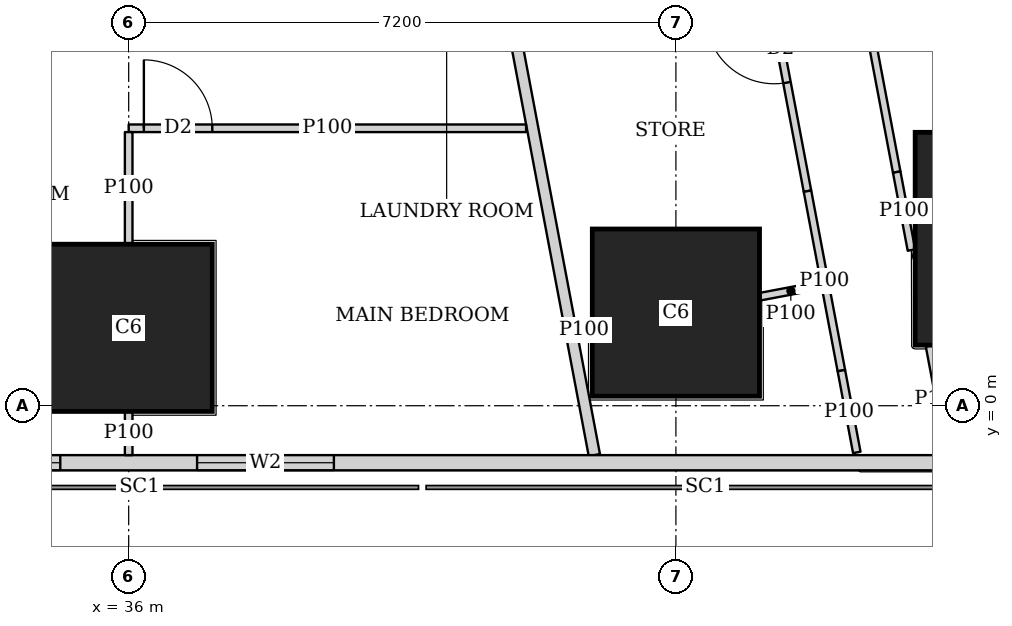
"""IFC4 building model, lengths in metres.
Left out: names, types, materials, properties, quantities, classifications, styles, units other than length and angle.
Written with IfcOpenShell. Run it as: python <this file> out.ifc"""

import sys

from ifc_helpers import new_model, si_unit, direction, frame, frame_2d, origin, origin_2d, place, context, subcontext, project, spatial, rectangle, extrude, element, fill, save


model = new_model("IFC4")
c1 = context("Model", 3, precision=1e-05, world=origin(), true_north=direction((0.0, 1.0)))
c2 = subcontext(c1, "Body", "Model", "MODEL_VIEW")
j1 = project(units=[si_unit("LENGTHUNIT", "METRE"), si_unit("PLANEANGLEUNIT", "RADIAN")], contexts=[c1])
p1 = place(None, origin())
s1 = spatial("IfcSite", under=j1, at=p1, CompositionType="ELEMENT")
p2 = place(p1, origin())
s2 = spatial("IfcBuilding", under=s1, at=p2, CompositionType="ELEMENT")
p3 = place(p2, frame((0.0, 0.0, 100.4)))
s3 = spatial("IfcBuildingStorey", under=s2, at=p3, CompositionType="ELEMENT", Elevation=100.4)
for number, where, z_axis, x_axis in (
    (1, (36.0, 1.025, 0.0), (0.0, 0.0, 1.0), (1.0, 0.0, 0.0)),
    (2, (43.2, 1.225, 0.0), (0.0, 0.0, 1.0), (1.0, 0.0, 0.0)),
):
    element("IfcColumn", number, at=place(p3, frame(where, z_axis=z_axis, x_axis=x_axis)), inside=s3, PredefinedType="COLUMN", context=c2, shape_type="SweptSolid", body=[
        extrude(rectangle(XDim=2.2, YDim=2.2, at=origin_2d()), origin(), (0.0, 0.0, 1.0), 3.75),
    ])
p4 = place(p3, frame((47.748, 2.197, 0.0), z_axis=(0.0, 0.0, 1.0), x_axis=(1.0, 0.0, 0.0)))
e3 = element("IfcColumn", 3, at=p4, inside=s3, PredefinedType="COLUMN", context=c2, shape_type="SweptSolid", body=[
    extrude(rectangle(XDim=2.8, YDim=2.8, at=origin_2d()), origin(), (0.0, 0.0, 1.0), 3.75),
])
p5 = place(p3, frame((2.163, -0.75, 0.0), z_axis=(0.0, 0.0, 1.0), x_axis=(1.0, 0.0, 0.0)))
e4 = element("IfcWall", 4, at=p5, inside=s3, PredefinedType="SOLIDWALL", context=c2, shape_type="SweptSolid", body=[
    extrude(rectangle(XDim=45.628, YDim=0.2, at=frame_2d((22.814, 0.0))), origin(), (0.0, 0.0, 1.0), 3.5),
])
p6 = place(p5, frame((9.537, 0.0, 0.9)))
e5 = element("IfcOpeningElement", 5, at=p6, cuts=e4, PredefinedType="OPENING", context=c2, shape_type="SweptSolid", body=[
    extrude(rectangle(XDim=1.8, YDim=1.5, at=frame_2d((0.9, 0.75))), frame((0.0, 0.11, 0.0), z_axis=(0.0, -1.0, 0.0), x_axis=(1.0, 0.0, 0.0)), (0.0, 0.0, 1.0), 0.22),
])
p7 = place(p5, frame((13.137, 0.0, 0.9)))
e6 = element("IfcOpeningElement", 6, at=p7, cuts=e4, PredefinedType="OPENING", context=c2, shape_type="SweptSolid", body=[
    extrude(rectangle(XDim=1.8, YDim=1.5, at=frame_2d((0.9, 0.75))), frame((0.0, 0.11, 0.0), z_axis=(0.0, -1.0, 0.0), x_axis=(1.0, 0.0, 0.0)), (0.0, 0.0, 1.0), 0.22),
])
p8 = place(p5, frame((16.737, 0.0, 0.9)))
e7 = element("IfcOpeningElement", 7, at=p8, cuts=e4, PredefinedType="OPENING", context=c2, shape_type="SweptSolid", body=[
    extrude(rectangle(XDim=1.8, YDim=1.5, at=frame_2d((0.9, 0.75))), frame((0.0, 0.11, 0.0), z_axis=(0.0, -1.0, 0.0), x_axis=(1.0, 0.0, 0.0)), (0.0, 0.0, 1.0), 0.22),
])
p9 = place(p5, frame((20.337, 0.0, 0.9)))
e8 = element("IfcOpeningElement", 8, at=p9, cuts=e4, PredefinedType="OPENING", context=c2, shape_type="SweptSolid", body=[
    extrude(rectangle(XDim=1.8, YDim=1.5, at=frame_2d((0.9, 0.75))), frame((0.0, 0.11, 0.0), z_axis=(0.0, -1.0, 0.0), x_axis=(1.0, 0.0, 0.0)), (0.0, 0.0, 1.0), 0.22),
])
p10 = place(p5, frame((23.937, 0.0, 0.9)))
e9 = element("IfcOpeningElement", 9, at=p10, cuts=e4, PredefinedType="OPENING", context=c2, shape_type="SweptSolid", body=[
    extrude(rectangle(XDim=1.8, YDim=1.5, at=frame_2d((0.9, 0.75))), frame((0.0, 0.11, 0.0), z_axis=(0.0, -1.0, 0.0), x_axis=(1.0, 0.0, 0.0)), (0.0, 0.0, 1.0), 0.22),
])
p11 = place(p5, frame((27.537, 0.0, 0.9)))
e10 = element("IfcOpeningElement", 10, at=p11, cuts=e4, PredefinedType="OPENING", context=c2, shape_type="SweptSolid", body=[
    extrude(rectangle(XDim=1.8, YDim=1.5, at=frame_2d((0.9, 0.75))), frame((0.0, 0.11, 0.0), z_axis=(0.0, -1.0, 0.0), x_axis=(1.0, 0.0, 0.0)), (0.0, 0.0, 1.0), 0.22),
])
p12 = place(p5, frame((31.137, 0.0, 0.9)))
e11 = element("IfcOpeningElement", 11, at=p12, cuts=e4, PredefinedType="OPENING", context=c2, shape_type="SweptSolid", body=[
    extrude(rectangle(XDim=1.8, YDim=1.5, at=frame_2d((0.9, 0.75))), frame((0.0, 0.11, 0.0), z_axis=(0.0, -1.0, 0.0), x_axis=(1.0, 0.0, 0.0)), (0.0, 0.0, 1.0), 0.22),
])
p13 = place(p5, frame((34.737, 0.0, 0.9)))
e12 = element("IfcOpeningElement", 12, at=p13, cuts=e4, PredefinedType="OPENING", context=c2, shape_type="SweptSolid", body=[
    extrude(rectangle(XDim=1.8, YDim=1.5, at=frame_2d((0.9, 0.75))), frame((0.0, 0.11, 0.0), z_axis=(0.0, -1.0, 0.0), x_axis=(1.0, 0.0, 0.0)), (0.0, 0.0, 1.0), 0.22),
])
p14 = place(p3, frame((50.653, 2.703, 0.0), z_axis=(0.0, 0.0, 1.0), x_axis=(-0.185612026696, 0.982623109613, 0.0)))
e13 = element("IfcWall", 13, at=p14, inside=s3, PredefinedType="SOLIDWALL", context=c2, shape_type="SweptSolid", body=[
    extrude(rectangle(XDim=41.393, YDim=0.2, at=frame_2d((20.697, 0.0))), origin(), (0.0, 0.0, 1.0), 3.5),
])
p15 = place(p14, frame((1.633, 0.0, 0.9)))
e14 = element("IfcOpeningElement", 14, at=p15, cuts=e13, PredefinedType="OPENING", context=c2, shape_type="SweptSolid", body=[
    extrude(rectangle(XDim=1.8, YDim=1.5, at=frame_2d((0.9, 0.75))), frame((0.0, 0.11, 0.0), z_axis=(0.0, -1.0, 0.0), x_axis=(1.0, 0.0, 0.0)), (0.0, 0.0, 1.0), 0.22),
])
p16 = place(p14, frame((6.032, 0.0, 0.9)))
e15 = element("IfcOpeningElement", 15, at=p16, cuts=e13, PredefinedType="OPENING", context=c2, shape_type="SweptSolid", body=[
    extrude(rectangle(XDim=1.8, YDim=1.5, at=frame_2d((0.9, 0.75))), frame((0.0, 0.11, 0.0), z_axis=(0.0, -1.0, 0.0), x_axis=(1.0, 0.0, 0.0)), (0.0, 0.0, 1.0), 0.22),
])
p17 = place(p14, frame((9.848, 0.0, 0.9)))
e16 = element("IfcOpeningElement", 16, at=p17, cuts=e13, PredefinedType="OPENING", context=c2, shape_type="SweptSolid", body=[
    extrude(rectangle(XDim=1.8, YDim=1.5, at=frame_2d((0.9, 0.75))), frame((0.0, 0.11, 0.0), z_axis=(0.0, -1.0, 0.0), x_axis=(1.0, 0.0, 0.0)), (0.0, 0.0, 1.0), 0.22),
])
p18 = place(p14, frame((13.664, 0.0, 0.9)))
e17 = element("IfcOpeningElement", 17, at=p18, cuts=e13, PredefinedType="OPENING", context=c2, shape_type="SweptSolid", body=[
    extrude(rectangle(XDim=1.8, YDim=1.5, at=frame_2d((0.9, 0.75))), frame((0.0, 0.11, 0.0), z_axis=(0.0, -1.0, 0.0), x_axis=(1.0, 0.0, 0.0)), (0.0, 0.0, 1.0), 0.22),
])
p19 = place(p14, frame((17.481, 0.0, 0.9)))
e18 = element("IfcOpeningElement", 18, at=p19, cuts=e13, PredefinedType="OPENING", context=c2, shape_type="SweptSolid", body=[
    extrude(rectangle(XDim=1.8, YDim=1.5, at=frame_2d((0.9, 0.75))), frame((0.0, 0.11, 0.0), z_axis=(0.0, -1.0, 0.0), x_axis=(1.0, 0.0, 0.0)), (0.0, 0.0, 1.0), 0.22),
])
p20 = place(p14, frame((21.297, 0.0, 0.9)))
e19 = element("IfcOpeningElement", 19, at=p20, cuts=e13, PredefinedType="OPENING", context=c2, shape_type="SweptSolid", body=[
    extrude(rectangle(XDim=1.8, YDim=1.5, at=frame_2d((0.9, 0.75))), frame((0.0, 0.11, 0.0), z_axis=(0.0, -1.0, 0.0), x_axis=(1.0, 0.0, 0.0)), (0.0, 0.0, 1.0), 0.22),
])
p21 = place(p14, frame((25.113, 0.0, 0.9)))
e20 = element("IfcOpeningElement", 20, at=p21, cuts=e13, PredefinedType="OPENING", context=c2, shape_type="SweptSolid", body=[
    extrude(rectangle(XDim=1.8, YDim=1.5, at=frame_2d((0.9, 0.75))), frame((0.0, 0.11, 0.0), z_axis=(0.0, -1.0, 0.0), x_axis=(1.0, 0.0, 0.0)), (0.0, 0.0, 1.0), 0.22),
])
p22 = place(p14, frame((28.93, 0.0, 0.9)))
e21 = element("IfcOpeningElement", 21, at=p22, cuts=e13, PredefinedType="OPENING", context=c2, shape_type="SweptSolid", body=[
    extrude(rectangle(XDim=1.8, YDim=1.5, at=frame_2d((0.9, 0.75))), frame((0.0, 0.11, 0.0), z_axis=(0.0, -1.0, 0.0), x_axis=(1.0, 0.0, 0.0)), (0.0, 0.0, 1.0), 0.22),
])
p23 = place(p14, frame((32.746, 0.0, 0.9)))
e22 = element("IfcOpeningElement", 22, at=p23, cuts=e13, PredefinedType="OPENING", context=c2, shape_type="SweptSolid", body=[
    extrude(rectangle(XDim=1.8, YDim=1.5, at=frame_2d((0.9, 0.75))), frame((0.0, 0.11, 0.0), z_axis=(0.0, -1.0, 0.0), x_axis=(1.0, 0.0, 0.0)), (0.0, 0.0, 1.0), 0.22),
])
p24 = place(p14, frame((36.481, 0.0, 0.9)))
e23 = element("IfcOpeningElement", 23, at=p24, cuts=e13, PredefinedType="OPENING", context=c2, shape_type="SweptSolid", body=[
    extrude(rectangle(XDim=1.8, YDim=1.5, at=frame_2d((0.9, 0.75))), frame((0.0, 0.11, 0.0), z_axis=(0.0, -1.0, 0.0), x_axis=(1.0, 0.0, 0.0)), (0.0, 0.0, 1.0), 0.22),
])
p25 = place(p3, frame((33.382, 45.65, 0.0), z_axis=(0.0, 0.0, 1.0), x_axis=(0.185593544777, -0.982626600565, 0.0)))
e24 = element("IfcWall", 24, at=p25, inside=s3, PredefinedType="SOLIDWALL", context=c2, shape_type="SweptSolid", body=[
    extrude(rectangle(XDim=47.118, YDim=0.15, at=frame_2d((23.559, 0.0))), origin(), (0.0, 0.0, 1.0), 2.2),
])
p26 = place(p25, frame((10.662, 0.0, 0.0)))
e25 = element("IfcOpeningElement", 25, at=p26, cuts=e24, PredefinedType="OPENING", context=c2, shape_type="SweptSolid", body=[
    extrude(rectangle(XDim=1.0, YDim=2.1, at=frame_2d((0.5, 1.05))), frame((0.0, 0.085, 0.0), z_axis=(0.0, -1.0, 0.0), x_axis=(1.0, 0.0, 0.0)), (0.0, 0.0, 1.0), 0.17),
])
p27 = place(p25, frame((15.237, 0.0, 0.0)))
e26 = element("IfcOpeningElement", 26, at=p27, cuts=e24, PredefinedType="OPENING", context=c2, shape_type="SweptSolid", body=[
    extrude(rectangle(XDim=1.0, YDim=2.1, at=frame_2d((0.5, 1.05))), frame((0.0, 0.085, 0.0), z_axis=(0.0, -1.0, 0.0), x_axis=(1.0, 0.0, 0.0)), (0.0, 0.0, 1.0), 0.17),
])
p28 = place(p25, frame((27.341, 0.0, 0.0)))
e27 = element("IfcOpeningElement", 27, at=p28, cuts=e24, PredefinedType="OPENING", context=c2, shape_type="SweptSolid", body=[
    extrude(rectangle(XDim=1.0, YDim=2.1, at=frame_2d((0.5, 1.05))), frame((0.0, 0.085, 0.0), z_axis=(0.0, -1.0, 0.0), x_axis=(1.0, 0.0, 0.0)), (0.0, 0.0, 1.0), 0.17),
])
p29 = place(p25, frame((33.833, 0.0, 0.0)))
e28 = element("IfcOpeningElement", 28, at=p29, cuts=e24, PredefinedType="OPENING", context=c2, shape_type="SweptSolid", body=[
    extrude(rectangle(XDim=1.0, YDim=2.1, at=frame_2d((0.5, 1.05))), frame((0.0, 0.085, 0.0), z_axis=(0.0, -1.0, 0.0), x_axis=(1.0, 0.0, 0.0)), (0.0, 0.0, 1.0), 0.17),
])
p30 = place(p3, frame((41.229, 3.65, 0.0), z_axis=(0.0, 0.0, 1.0), x_axis=(-1.0, 0.0, 0.0)))
e29 = element("IfcWall", 29, at=p30, inside=s3, PredefinedType="PARTITIONING", context=c2, shape_type="SweptSolid", body=[
    extrude(rectangle(XDim=5.229, YDim=0.1, at=frame_2d((2.615, 0.0))), origin(), (0.0, 0.0, 1.0), 3.5),
])
p31 = place(p30, frame((4.129, 0.0, 0.0)))
e30 = element("IfcOpeningElement", 30, at=p31, cuts=e29, PredefinedType="OPENING", context=c2, shape_type="SweptSolid", body=[
    extrude(rectangle(XDim=0.9, YDim=2.1, at=frame_2d((0.45, 1.05))), frame((0.0, 0.06, 0.0), z_axis=(0.0, -1.0, 0.0), x_axis=(1.0, 0.0, 0.0)), (0.0, 0.0, 1.0), 0.12),
])
p32 = place(p3, frame((36.0, -0.65, 0.0), z_axis=(0.0, 0.0, 1.0), x_axis=(0.0, 1.0, 0.0)))
e31 = element("IfcWall", 31, at=p32, inside=s3, PredefinedType="PARTITIONING", context=c2, shape_type="SweptSolid", body=[
    extrude(rectangle(XDim=0.574, YDim=0.1, at=frame_2d((0.287, 0.0))), origin(), (0.0, 0.0, 1.0), 3.5),
])
p33 = place(p3, frame((36.0, 2.126, 0.0), z_axis=(0.0, 0.0, 1.0), x_axis=(0.0, 1.0, 0.0)))
e32 = element("IfcWall", 32, at=p33, inside=s3, PredefinedType="PARTITIONING", context=c2, shape_type="SweptSolid", body=[
    extrude(rectangle(XDim=1.474, YDim=0.1, at=frame_2d((0.737, 0.0))), origin(), (0.0, 0.0, 1.0), 3.5),
])
p34 = place(p3, frame((44.727, 10.366, 0.0), z_axis=(0.0, 0.0, 1.0), x_axis=(0.185678775129, -0.982610498858, 0.0)))
e33 = element("IfcWall", 33, at=p34, inside=s3, PredefinedType="PARTITIONING", context=c2, shape_type="SweptSolid", body=[
    extrude(rectangle(XDim=7.421, YDim=0.1, at=frame_2d((3.71, 0.0))), origin(), (0.0, 0.0, 1.0), 3.5),
])
p35 = place(p34, frame((0.151, 0.0, 0.0)))
e34 = element("IfcOpeningElement", 34, at=p35, cuts=e33, PredefinedType="OPENING", context=c2, shape_type="SweptSolid", body=[
    extrude(rectangle(XDim=0.9, YDim=2.1, at=frame_2d((0.45, 1.05))), frame((0.0, 0.06, 0.0), z_axis=(0.0, -1.0, 0.0), x_axis=(1.0, 0.0, 0.0)), (0.0, 0.0, 1.0), 0.12),
])
p36 = place(p34, frame((4.55, 0.0, 0.0)))
e35 = element("IfcOpeningElement", 35, at=p36, cuts=e33, PredefinedType="OPENING", context=c2, shape_type="SweptSolid", body=[
    extrude(rectangle(XDim=0.9, YDim=2.1, at=frame_2d((0.45, 1.05))), frame((0.0, 0.06, 0.0), z_axis=(0.0, -1.0, 0.0), x_axis=(1.0, 0.0, 0.0)), (0.0, 0.0, 1.0), 0.12),
])
p37 = place(p3, frame((46.105, 3.074, 0.0), z_axis=(0.0, 0.0, 1.0), x_axis=(0.185897769544, -0.982569091351, 0.0)))
e36 = element("IfcWall", 36, at=p37, inside=s3, PredefinedType="PARTITIONING", context=c2, shape_type="SweptSolid", body=[
    extrude(rectangle(XDim=1.044, YDim=0.1, at=frame_2d((0.522, 0.0))), origin(), (0.0, 0.0, 1.0), 2.05),
])
p38 = place(p3, frame((46.537, 0.787, 0.0), z_axis=(0.0, 0.0, 1.0), x_axis=(0.185348284603, -0.982672892368, 0.0)))
e37 = element("IfcWall", 37, at=p38, inside=s3, PredefinedType="PARTITIONING", context=c2, shape_type="SweptSolid", body=[
    extrude(rectangle(XDim=1.419, YDim=0.1, at=frame_2d((0.709, 0.0))), origin(), (0.0, 0.0, 1.0), 2.05),
])
p39 = place(p3, frame((44.049, 7.49, 0.0), z_axis=(0.0, 0.0, 1.0), x_axis=(0.185666332607, -0.982612849975, 0.0)))
e38 = element("IfcWall", 38, at=p39, inside=s3, PredefinedType="PARTITIONING", context=c2, shape_type="SweptSolid", body=[
    extrude(rectangle(XDim=4.75, YDim=0.1, at=frame_2d((2.375, 0.0))), origin(), (0.0, 0.0, 1.0), 3.5),
])
p40 = place(p39, frame((0.8, 0.0, 0.0)))
e39 = element("IfcOpeningElement", 39, at=p40, cuts=e38, PredefinedType="OPENING", context=c2, shape_type="SweptSolid", body=[
    extrude(rectangle(XDim=0.9, YDim=2.1, at=frame_2d((0.45, 1.05))), frame((0.0, 0.06, 0.0), z_axis=(0.0, -1.0, 0.0), x_axis=(1.0, 0.0, 0.0)), (0.0, 0.0, 1.0), 0.12),
])
p41 = place(p39, frame((2.396, 0.0, 0.0)))
e40 = element("IfcOpeningElement", 40, at=p41, cuts=e38, PredefinedType="OPENING", context=c2, shape_type="SweptSolid", body=[
    extrude(rectangle(XDim=0.9, YDim=2.1, at=frame_2d((0.45, 1.05))), frame((0.0, 0.06, 0.0), z_axis=(0.0, -1.0, 0.0), x_axis=(1.0, 0.0, 0.0)), (0.0, 0.0, 1.0), 0.12),
])
p42 = place(p3, frame((44.931, 2.823, 0.0), z_axis=(0.0, 0.0, 1.0), x_axis=(0.185631845838, -0.982619365681, 0.0)))
e41 = element("IfcWall", 41, at=p42, inside=s3, PredefinedType="PARTITIONING", context=c2, shape_type="SweptSolid", body=[
    extrude(rectangle(XDim=2.403, YDim=0.1, at=frame_2d((1.201, 0.0))), origin(), (0.0, 0.0, 1.0), 2.05),
])
p43 = place(p3, frame((45.377, 0.462, 0.0), z_axis=(0.0, 0.0, 1.0), x_axis=(0.185513480919, -0.982641719243, 0.0)))
e42 = element("IfcWall", 42, at=p43, inside=s3, PredefinedType="PARTITIONING", context=c2, shape_type="SweptSolid", body=[
    extrude(rectangle(XDim=1.095, YDim=0.1, at=frame_2d((0.547, 0.0))), origin(), (0.0, 0.0, 1.0), 3.5),
])
p44 = place(p3, frame((45.114, 1.587, 0.0), z_axis=(0.0, 0.0, 1.0), x_axis=(-0.982624706348, -0.185603573443, 0.0)))
e43 = element("IfcWall", 43, at=p44, inside=s3, PredefinedType="PARTITIONING", context=c2, shape_type="SweptSolid", body=[
    extrude(rectangle(XDim=0.818, YDim=0.1, at=frame_2d((0.409, 0.0))), origin(), (0.0, 0.0, 1.0), 2.05),
])
p45 = place(p3, frame((42.09, 1.016, 0.0), z_axis=(0.0, 0.0, 1.0), x_axis=(-0.982208563973, -0.187793335502, 0.0)))
e44 = element("IfcWall", 44, at=p45, inside=s3, PredefinedType="PARTITIONING", context=c2, shape_type="SweptSolid", body=[
    extrude(rectangle(XDim=0.198, YDim=0.1, at=frame_2d((0.099, 0.0))), origin(), (0.0, 0.0, 1.0), 2.05),
])
p46 = place(p12, origin())
e45 = element("IfcWindow", 45, at=p46, inside=s3, PartitioningType="SINGLE_PANEL", PredefinedType="WINDOW", context=c2, shape_type="SweptSolid", body=[
    extrude(rectangle(XDim=1.8, YDim=1.5, at=frame_2d((0.9, 0.75))), frame((0.0, 0.03, 0.0), z_axis=(0.0, -1.0, 0.0), x_axis=(1.0, 0.0, 0.0)), (0.0, 0.0, 1.0), 0.06),
])
fill(e11, e45)
p47 = place(p13, origin())
e46 = element("IfcWindow", 46, at=p47, inside=s3, PartitioningType="SINGLE_PANEL", PredefinedType="WINDOW", context=c2, shape_type="SweptSolid", body=[
    extrude(rectangle(XDim=1.8, YDim=1.5, at=frame_2d((0.9, 0.75))), frame((0.0, 0.03, 0.0), z_axis=(0.0, -1.0, 0.0), x_axis=(1.0, 0.0, 0.0)), (0.0, 0.0, 1.0), 0.06),
])
fill(e12, e46)
p48 = place(p31, origin())
e47 = element("IfcDoor", 47, at=p48, inside=s3, OperationType="SINGLE_SWING_LEFT", PredefinedType="DOOR", context=c2, shape_type="SweptSolid", body=[
    extrude(rectangle(XDim=0.9, YDim=2.1, at=frame_2d((0.45, 1.05))), frame((0.0, 0.025, 0.0), z_axis=(0.0, -1.0, 0.0), x_axis=(1.0, 0.0, 0.0)), (0.0, 0.0, 1.0), 0.05),
])
fill(e30, e47)
p49 = place(p41, origin())
e48 = element("IfcDoor", 48, at=p49, inside=s3, OperationType="SINGLE_SWING_RIGHT", PredefinedType="DOOR", context=c2, shape_type="SweptSolid", body=[
    extrude(rectangle(XDim=0.9, YDim=2.1, at=frame_2d((0.45, 1.05))), frame((0.0, 0.025, 0.0), z_axis=(0.0, -1.0, 0.0), x_axis=(1.0, 0.0, 0.0)), (0.0, 0.0, 1.0), 0.05),
])
fill(e40, e48)
save(model, sys.argv[1])
